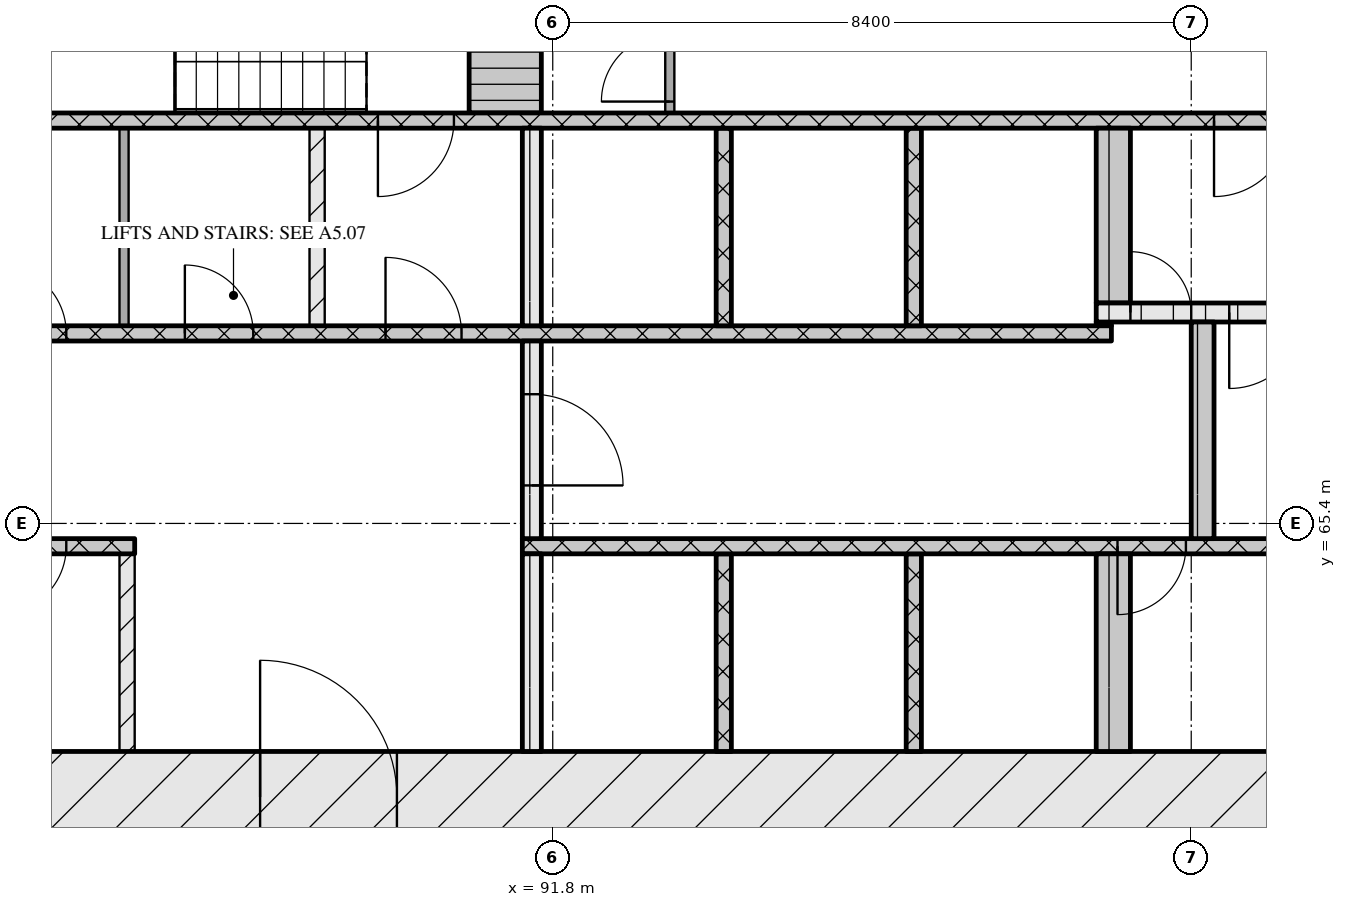
"""IFC4 building model, lengths in metres.
Left out: names, types, materials, properties, quantities, classifications, styles, units other than length and angle.
Written with IfcOpenShell. Run it as: python <this file> out.ifc"""

import sys

from ifc_helpers import new_model, si_unit, direction, frame, frame_2d, origin, place, context, subcontext, project, spatial, rectangle, extrude, element, fill, save


model = new_model("IFC4")
c1 = context("Model", 3, precision=1e-05, world=origin(), true_north=direction((0.0, 1.0)))
c2 = subcontext(c1, "Body", "Model", "MODEL_VIEW")
j1 = project(units=[si_unit("LENGTHUNIT", "METRE"), si_unit("PLANEANGLEUNIT", "RADIAN")], contexts=[c1])
p1 = place(None, origin())
s1 = spatial("IfcSite", under=j1, at=p1, CompositionType="ELEMENT")
p2 = place(p1, origin())
s2 = spatial("IfcBuilding", under=s1, at=p2, CompositionType="ELEMENT")
p3 = place(p2, frame((0.0, 0.0, 40.8)))
s3 = spatial("IfcBuildingStorey", under=s2, at=p3, CompositionType="ELEMENT", Elevation=40.8)
p4 = place(p3, frame((66.6, 61.8, 0.0), z_axis=(0.0, 0.0, 1.0), x_axis=(1.0, 0.0, 0.0)))
e1 = element("IfcWall", 1, at=p4, inside=s3, PredefinedType="SOLIDWALL", context=c2, shape_type="SweptSolid", body=[
    extrude(rectangle(XDim=42.0, YDim=1.2, at=frame_2d((21.0, 0.0))), origin(), (0.0, 0.0, 1.0), 3.32),
])
p5 = place(p4, frame((21.35, 0.0, 0.0)))
e2 = element("IfcOpeningElement", 2, at=p5, cuts=e1, PredefinedType="OPENING", context=c2, shape_type="SweptSolid", body=[
    extrude(rectangle(XDim=1.8, YDim=2.1, at=frame_2d((0.9, 1.05))), frame((0.0, 0.61, 0.0), z_axis=(0.0, -1.0, 0.0), x_axis=(1.0, 0.0, 0.0)), (0.0, 0.0, 1.0), 1.22),
])
p6 = place(p3, frame((86.2, 62.4, 0.0), z_axis=(0.0, 0.0, 1.0), x_axis=(0.0, 1.0, 0.0)))
e3 = element("IfcWall", 3, at=p6, inside=s3, PredefinedType="PARTITIONING", context=c2, shape_type="SweptSolid", body=[
    extrude(rectangle(XDim=2.6, YDim=0.2, at=frame_2d((1.3, 0.0))), origin(), (0.0, 0.0, 1.0), 3.32),
])
p7 = place(p3, frame((91.525, 62.4, 0.0), z_axis=(0.0, 0.0, 1.0), x_axis=(0.0, 1.0, 0.0)))
e4 = element("IfcWall", 4, at=p7, inside=s3, PredefinedType="SOLIDWALL", context=c2, shape_type="SweptSolid", body=[
    extrude(rectangle(XDim=2.6, YDim=0.25, at=frame_2d((1.3, 0.0))), origin(), (0.0, 0.0, 1.0), 3.32),
])
for number, where, z_axis, x_axis in (
    (5, (94.05, 62.4, 0.0), (0.0, 0.0, 1.0), (0.0, 1.0, 0.0)),
    (6, (96.55, 62.4, 0.0), (0.0, 0.0, 1.0), (0.0, 1.0, 0.0)),
):
    element("IfcWall", number, at=place(p3, frame(where, z_axis=z_axis, x_axis=x_axis)), inside=s3, PredefinedType="SOLIDWALL", context=c2, shape_type="SweptSolid", body=[
        extrude(rectangle(XDim=2.6, YDim=0.2, at=frame_2d((1.3, 0.0))), origin(), (0.0, 0.0, 1.0), 3.32),
    ])
p8 = place(p3, frame((99.175, 62.4, 0.0), z_axis=(0.0, 0.0, 1.0), x_axis=(0.0, 1.0, 0.0)))
e7 = element("IfcWall", 7, at=p8, inside=s3, PredefinedType="SOLIDWALL", context=c2, shape_type="SweptSolid", body=[
    extrude(rectangle(XDim=2.6, YDim=0.45, at=frame_2d((1.3, 0.0))), origin(), (0.0, 0.0, 1.0), 3.32),
])
p9 = place(p3, frame((67.8, 65.1, 0.0), z_axis=(0.0, 0.0, 1.0), x_axis=(1.0, 0.0, 0.0)))
e8 = element("IfcWall", 8, at=p9, inside=s3, PredefinedType="SOLIDWALL", context=c2, shape_type="SweptSolid", body=[
    extrude(rectangle(XDim=18.5, YDim=0.2, at=frame_2d((9.25, 0.0))), origin(), (0.0, 0.0, 1.0), 3.32),
])
p10 = place(p9, frame((7.27, 0.0, 0.0)))
e9 = element("IfcOpeningElement", 9, at=p10, cuts=e8, PredefinedType="OPENING", context=c2, shape_type="SweptSolid", body=[
    extrude(rectangle(XDim=0.9, YDim=2.1, at=frame_2d((0.45, 1.05))), frame((0.0, 0.11, 0.0), z_axis=(0.0, -1.0, 0.0), x_axis=(1.0, 0.0, 0.0)), (0.0, 0.0, 1.0), 0.22),
])
p11 = place(p9, frame((8.85, 0.0, 0.0)))
e10 = element("IfcOpeningElement", 10, at=p11, cuts=e8, PredefinedType="OPENING", context=c2, shape_type="SweptSolid", body=[
    extrude(rectangle(XDim=1.1, YDim=2.1, at=frame_2d((0.55, 1.05))), frame((0.0, 0.11, 0.0), z_axis=(0.0, -1.0, 0.0), x_axis=(1.0, 0.0, 0.0)), (0.0, 0.0, 1.0), 0.22),
])
p12 = place(p9, frame((11.35, 0.0, 0.0)))
e11 = element("IfcOpeningElement", 11, at=p12, cuts=e8, PredefinedType="OPENING", context=c2, shape_type="SweptSolid", body=[
    extrude(rectangle(XDim=1.1, YDim=2.1, at=frame_2d((0.55, 1.05))), frame((0.0, 0.11, 0.0), z_axis=(0.0, -1.0, 0.0), x_axis=(1.0, 0.0, 0.0)), (0.0, 0.0, 1.0), 0.22),
])
p13 = place(p9, frame((13.85, 0.0, 0.0)))
e12 = element("IfcOpeningElement", 12, at=p13, cuts=e8, PredefinedType="OPENING", context=c2, shape_type="SweptSolid", body=[
    extrude(rectangle(XDim=1.1, YDim=2.1, at=frame_2d((0.55, 1.05))), frame((0.0, 0.11, 0.0), z_axis=(0.0, -1.0, 0.0), x_axis=(1.0, 0.0, 0.0)), (0.0, 0.0, 1.0), 0.22),
])
p14 = place(p9, frame((16.7, 0.0, 0.0)))
e13 = element("IfcOpeningElement", 13, at=p14, cuts=e8, PredefinedType="OPENING", context=c2, shape_type="SweptSolid", body=[
    extrude(rectangle(XDim=0.9, YDim=2.1, at=frame_2d((0.45, 1.05))), frame((0.0, 0.11, 0.0), z_axis=(0.0, -1.0, 0.0), x_axis=(1.0, 0.0, 0.0)), (0.0, 0.0, 1.0), 0.22),
])
p15 = place(p3, frame((91.4, 65.1, 0.0), z_axis=(0.0, 0.0, 1.0), x_axis=(1.0, 0.0, 0.0)))
e14 = element("IfcWall", 14, at=p15, inside=s3, PredefinedType="SOLIDWALL", context=c2, shape_type="SweptSolid", body=[
    extrude(rectangle(XDim=16.0, YDim=0.2, at=frame_2d((8.0, 0.0))), origin(), (0.0, 0.0, 1.0), 3.32),
])
p16 = place(p15, frame((7.83, 0.0, 0.0)))
e15 = element("IfcOpeningElement", 15, at=p16, cuts=e14, PredefinedType="OPENING", context=c2, shape_type="SweptSolid", body=[
    extrude(rectangle(XDim=0.9, YDim=2.1, at=frame_2d((0.45, 1.05))), frame((0.0, 0.11, 0.0), z_axis=(0.0, -1.0, 0.0), x_axis=(1.0, 0.0, 0.0)), (0.0, 0.0, 1.0), 0.22),
])
p17 = place(p3, frame((91.525, 65.2, 0.0), z_axis=(0.0, 0.0, 1.0), x_axis=(0.0, 1.0, 0.0)))
e16 = element("IfcWall", 16, at=p17, inside=s3, PredefinedType="SOLIDWALL", context=c2, shape_type="SweptSolid", body=[
    extrude(rectangle(XDim=2.6, YDim=0.25, at=frame_2d((1.3, 0.0))), origin(), (0.0, 0.0, 1.0), 3.32),
])
p18 = place(p17, frame((0.7, 0.0, 0.0)))
e17 = element("IfcOpeningElement", 17, at=p18, cuts=e16, PredefinedType="OPENING", context=c2, shape_type="SweptSolid", body=[
    extrude(rectangle(XDim=1.2, YDim=2.1, at=frame_2d((0.6, 1.05))), frame((0.0, 0.135, 0.0), z_axis=(0.0, -1.0, 0.0), x_axis=(1.0, 0.0, 0.0)), (0.0, 0.0, 1.0), 0.27),
])
p19 = place(p3, frame((100.35, 65.2, 0.0), z_axis=(0.0, 0.0, 1.0), x_axis=(0.0, 1.0, 0.0)))
e18 = element("IfcWall", 18, at=p19, inside=s3, PredefinedType="SOLIDWALL", context=c2, shape_type="SweptSolid", body=[
    extrude(rectangle(XDim=2.85, YDim=0.3, at=frame_2d((1.425, 0.0))), origin(), (0.0, 0.0, 1.0), 3.32),
])
p20 = place(p3, frame((76.05, 67.9, 0.0), z_axis=(0.0, 0.0, 1.0), x_axis=(1.0, 0.0, 0.0)))
e19 = element("IfcWall", 19, at=p20, inside=s3, PredefinedType="SOLIDWALL", context=c2, shape_type="SweptSolid", body=[
    extrude(rectangle(XDim=23.1, YDim=0.2, at=frame_2d((11.55, 0.0))), origin(), (0.0, 0.0, 1.0), 3.32),
])
p21 = place(p20, frame((0.6, 0.0, 0.0)))
e20 = element("IfcOpeningElement", 20, at=p21, cuts=e19, PredefinedType="OPENING", context=c2, shape_type="SweptSolid", body=[
    extrude(rectangle(XDim=1.1, YDim=2.1, at=frame_2d((0.55, 1.05))), frame((0.0, 0.11, 0.0), z_axis=(0.0, -1.0, 0.0), x_axis=(1.0, 0.0, 0.0)), (0.0, 0.0, 1.0), 0.22),
])
p22 = place(p20, frame((3.1, 0.0, 0.0)))
e21 = element("IfcOpeningElement", 21, at=p22, cuts=e19, PredefinedType="OPENING", context=c2, shape_type="SweptSolid", body=[
    extrude(rectangle(XDim=1.1, YDim=2.1, at=frame_2d((0.55, 1.05))), frame((0.0, 0.11, 0.0), z_axis=(0.0, -1.0, 0.0), x_axis=(1.0, 0.0, 0.0)), (0.0, 0.0, 1.0), 0.22),
])
p23 = place(p20, frame((5.6, 0.0, 0.0)))
e22 = element("IfcOpeningElement", 22, at=p23, cuts=e19, PredefinedType="OPENING", context=c2, shape_type="SweptSolid", body=[
    extrude(rectangle(XDim=1.1, YDim=2.1, at=frame_2d((0.55, 1.05))), frame((0.0, 0.11, 0.0), z_axis=(0.0, -1.0, 0.0), x_axis=(1.0, 0.0, 0.0)), (0.0, 0.0, 1.0), 0.22),
])
p24 = place(p20, frame((8.45, 0.0, 0.0)))
e23 = element("IfcOpeningElement", 23, at=p24, cuts=e19, PredefinedType="OPENING", context=c2, shape_type="SweptSolid", body=[
    extrude(rectangle(XDim=0.9, YDim=2.1, at=frame_2d((0.45, 1.05))), frame((0.0, 0.11, 0.0), z_axis=(0.0, -1.0, 0.0), x_axis=(1.0, 0.0, 0.0)), (0.0, 0.0, 1.0), 0.22),
])
p25 = place(p20, frame((10.91, 0.0, 0.0)))
e24 = element("IfcOpeningElement", 24, at=p25, cuts=e19, PredefinedType="OPENING", context=c2, shape_type="SweptSolid", body=[
    extrude(rectangle(XDim=0.9, YDim=2.1, at=frame_2d((0.45, 1.05))), frame((0.0, 0.11, 0.0), z_axis=(0.0, -1.0, 0.0), x_axis=(1.0, 0.0, 0.0)), (0.0, 0.0, 1.0), 0.22),
])
p26 = place(p20, frame((13.55, 0.0, 0.0)))
e25 = element("IfcOpeningElement", 25, at=p26, cuts=e19, PredefinedType="OPENING", context=c2, shape_type="SweptSolid", body=[
    extrude(rectangle(XDim=1.0, YDim=2.1, at=frame_2d((0.5, 1.05))), frame((0.0, 0.11, 0.0), z_axis=(0.0, -1.0, 0.0), x_axis=(1.0, 0.0, 0.0)), (0.0, 0.0, 1.0), 0.22),
])
p27 = place(p3, frame((86.16, 68.0, 0.0), z_axis=(0.0, 0.0, 1.0), x_axis=(0.0, 1.0, 0.0)))
e26 = element("IfcWall", 26, at=p27, inside=s3, PredefinedType="PARTITIONING", context=c2, shape_type="SweptSolid", body=[
    extrude(rectangle(XDim=2.6, YDim=0.12, at=frame_2d((1.3, 0.0))), origin(), (0.0, 0.0, 1.0), 3.32),
])
p28 = place(p3, frame((88.7, 68.0, 0.0), z_axis=(0.0, 0.0, 1.0), x_axis=(0.0, 1.0, 0.0)))
e27 = element("IfcWall", 27, at=p28, inside=s3, PredefinedType="PARTITIONING", context=c2, shape_type="SweptSolid", body=[
    extrude(rectangle(XDim=2.6, YDim=0.2, at=frame_2d((1.3, 0.0))), origin(), (0.0, 0.0, 1.0), 3.32),
])
p29 = place(p3, frame((91.525, 68.0, 0.0), z_axis=(0.0, 0.0, 1.0), x_axis=(0.0, 1.0, 0.0)))
e28 = element("IfcWall", 28, at=p29, inside=s3, PredefinedType="SOLIDWALL", context=c2, shape_type="SweptSolid", body=[
    extrude(rectangle(XDim=2.6, YDim=0.25, at=frame_2d((1.3, 0.0))), origin(), (0.0, 0.0, 1.0), 3.32),
])
for number, where, z_axis, x_axis in (
    (29, (94.05, 68.0, 0.0), (0.0, 0.0, 1.0), (0.0, 1.0, 0.0)),
    (30, (96.55, 68.0, 0.0), (0.0, 0.0, 1.0), (0.0, 1.0, 0.0)),
):
    element("IfcWall", number, at=place(p3, frame(where, z_axis=z_axis, x_axis=x_axis)), inside=s3, PredefinedType="SOLIDWALL", context=c2, shape_type="SweptSolid", body=[
        extrude(rectangle(XDim=2.6, YDim=0.2, at=frame_2d((1.3, 0.0))), origin(), (0.0, 0.0, 1.0), 3.32),
    ])
p30 = place(p3, frame((98.95, 68.025, 0.0), z_axis=(0.0, 0.0, 1.0), x_axis=(1.0, 0.0, 0.0)))
e31 = element("IfcWall", 31, at=p30, inside=s3, PredefinedType="SOLIDWALL", context=c2, shape_type="SweptSolid", body=[
    extrude(rectangle(XDim=0.2, YDim=0.05, at=frame_2d((0.1, 0.0))), origin(), (0.0, 0.0, 1.0), 3.32),
])
p31 = place(p3, frame((98.95, 68.175, 0.0), z_axis=(0.0, 0.0, 1.0), x_axis=(1.0, 0.0, 0.0)))
e32 = element("IfcWall", 32, at=p31, inside=s3, PredefinedType="SOLIDWALL", context=c2, shape_type="SweptSolid", body=[
    extrude(rectangle(XDim=8.45, YDim=0.25, at=frame_2d((4.225, 0.0))), origin(), (0.0, 0.0, 1.0), 3.32),
])
p32 = place(p31, frame((0.45, 0.0, 0.0)))
e33 = element("IfcOpeningElement", 33, at=p32, cuts=e32, PredefinedType="OPENING", context=c2, shape_type="SweptSolid", body=[
    extrude(rectangle(XDim=0.8, YDim=2.1, at=frame_2d((0.4, 1.05))), frame((0.0, 0.135, 0.0), z_axis=(0.0, -1.0, 0.0), x_axis=(1.0, 0.0, 0.0)), (0.0, 0.0, 1.0), 0.27),
])
p33 = place(p31, frame((1.75, 0.0, 0.0)))
e34 = element("IfcOpeningElement", 34, at=p33, cuts=e32, PredefinedType="OPENING", context=c2, shape_type="SweptSolid", body=[
    extrude(rectangle(XDim=1.0, YDim=2.1, at=frame_2d((0.5, 1.05))), frame((0.0, 0.135, 0.0), z_axis=(0.0, -1.0, 0.0), x_axis=(1.0, 0.0, 0.0)), (0.0, 0.0, 1.0), 0.27),
])
p34 = place(p3, frame((99.175, 68.3, 0.0), z_axis=(0.0, 0.0, 1.0), x_axis=(0.0, 1.0, 0.0)))
e35 = element("IfcWall", 35, at=p34, inside=s3, PredefinedType="SOLIDWALL", context=c2, shape_type="SweptSolid", body=[
    extrude(rectangle(XDim=2.3, YDim=0.45, at=frame_2d((1.15, 0.0))), origin(), (0.0, 0.0, 1.0), 3.32),
])
p35 = place(p3, frame((67.8, 70.7, 0.0), z_axis=(0.0, 0.0, 1.0), x_axis=(1.0, 0.0, 0.0)))
e36 = element("IfcWall", 36, at=p35, inside=s3, PredefinedType="SOLIDWALL", context=c2, shape_type="SweptSolid", body=[
    extrude(rectangle(XDim=39.6, YDim=0.2, at=frame_2d((19.8, 0.0))), origin(), (0.0, 0.0, 1.0), 3.32),
])
p36 = place(p35, frame((0.65, 0.0, 0.0)))
e37 = element("IfcOpeningElement", 37, at=p36, cuts=e36, PredefinedType="OPENING", context=c2, shape_type="SweptSolid", body=[
    extrude(rectangle(XDim=1.1, YDim=2.1, at=frame_2d((0.55, 1.05))), frame((0.0, 0.11, 0.0), z_axis=(0.0, -1.0, 0.0), x_axis=(1.0, 0.0, 0.0)), (0.0, 0.0, 1.0), 0.22),
])
p37 = place(p35, frame((3.25, 0.0, 0.0)))
e38 = element("IfcOpeningElement", 38, at=p37, cuts=e36, PredefinedType="OPENING", context=c2, shape_type="SweptSolid", body=[
    extrude(rectangle(XDim=1.1, YDim=2.1, at=frame_2d((0.55, 1.05))), frame((0.0, 0.11, 0.0), z_axis=(0.0, -1.0, 0.0), x_axis=(1.0, 0.0, 0.0)), (0.0, 0.0, 1.0), 0.22),
])
p38 = place(p35, frame((5.9, 0.0, 0.0)))
e39 = element("IfcOpeningElement", 39, at=p38, cuts=e36, PredefinedType="OPENING", context=c2, shape_type="SweptSolid", body=[
    extrude(rectangle(XDim=1.0, YDim=2.1, at=frame_2d((0.5, 1.05))), frame((0.0, 0.11, 0.0), z_axis=(0.0, -1.0, 0.0), x_axis=(1.0, 0.0, 0.0)), (0.0, 0.0, 1.0), 0.22),
])
p39 = place(p35, frame((21.7, 0.0, 0.0)))
e40 = element("IfcOpeningElement", 40, at=p39, cuts=e36, PredefinedType="OPENING", context=c2, shape_type="SweptSolid", body=[
    extrude(rectangle(XDim=1.0, YDim=2.1, at=frame_2d((0.5, 1.05))), frame((0.0, 0.11, 0.0), z_axis=(0.0, -1.0, 0.0), x_axis=(1.0, 0.0, 0.0)), (0.0, 0.0, 1.0), 0.22),
])
p40 = place(p35, frame((32.7, 0.0, 0.0)))
e41 = element("IfcOpeningElement", 41, at=p40, cuts=e36, PredefinedType="OPENING", context=c2, shape_type="SweptSolid", body=[
    extrude(rectangle(XDim=1.0, YDim=2.1, at=frame_2d((0.5, 1.05))), frame((0.0, 0.11, 0.0), z_axis=(0.0, -1.0, 0.0), x_axis=(1.0, 0.0, 0.0)), (0.0, 0.0, 1.0), 0.22),
])
p41 = place(p35, frame((35.25, 0.0, 0.0)))
e42 = element("IfcOpeningElement", 42, at=p41, cuts=e36, PredefinedType="OPENING", context=c2, shape_type="SweptSolid", body=[
    extrude(rectangle(XDim=1.1, YDim=2.1, at=frame_2d((0.55, 1.05))), frame((0.0, 0.11, 0.0), z_axis=(0.0, -1.0, 0.0), x_axis=(1.0, 0.0, 0.0)), (0.0, 0.0, 1.0), 0.22),
])
p42 = place(p35, frame((37.85, 0.0, 0.0)))
e43 = element("IfcOpeningElement", 43, at=p42, cuts=e36, PredefinedType="OPENING", context=c2, shape_type="SweptSolid", body=[
    extrude(rectangle(XDim=1.1, YDim=2.1, at=frame_2d((0.55, 1.05))), frame((0.0, 0.11, 0.0), z_axis=(0.0, -1.0, 0.0), x_axis=(1.0, 0.0, 0.0)), (0.0, 0.0, 1.0), 0.22),
])
p43 = place(p3, frame((91.175, 70.8, 0.0), z_axis=(0.0, 0.0, 1.0), x_axis=(0.0, 1.0, 0.0)))
e44 = element("IfcWall", 44, at=p43, inside=s3, PredefinedType="SOLIDWALL", context=c2, shape_type="SweptSolid", body=[
    extrude(rectangle(XDim=2.95, YDim=0.95, at=frame_2d((1.475, 0.0))), origin(), (0.0, 0.0, 1.0), 3.32),
])
p44 = place(p3, frame((93.34, 70.8, 0.0), z_axis=(0.0, 0.0, 1.0), x_axis=(0.0, 1.0, 0.0)))
e45 = element("IfcWall", 45, at=p44, inside=s3, PredefinedType="PARTITIONING", context=c2, shape_type="SweptSolid", body=[
    extrude(rectangle(XDim=1.2, YDim=0.12, at=frame_2d((0.6, 0.0))), origin(), (0.0, 0.0, 1.0), 3.32),
])
p45 = place(p44, frame((0.15, 0.0, 0.0)))
e46 = element("IfcOpeningElement", 46, at=p45, cuts=e45, PredefinedType="OPENING", context=c2, shape_type="SweptSolid", body=[
    extrude(rectangle(XDim=0.9, YDim=2.1, at=frame_2d((0.45, 1.05))), frame((0.0, 0.07, 0.0), z_axis=(0.0, -1.0, 0.0), x_axis=(1.0, 0.0, 0.0)), (0.0, 0.0, 1.0), 0.14),
])
p46 = place(p5, origin())
e47 = element("IfcDoor", 47, at=p46, inside=s3, OperationType="DOUBLE_DOOR_SINGLE_SWING", PredefinedType="DOOR", context=c2, shape_type="SweptSolid", body=[
    extrude(rectangle(XDim=1.8, YDim=2.1, at=frame_2d((0.9, 1.05))), frame((0.0, 0.025, 0.0), z_axis=(0.0, -1.0, 0.0), x_axis=(1.0, 0.0, 0.0)), (0.0, 0.0, 1.0), 0.05),
])
fill(e2, e47)
p47 = place(p14, origin())
e48 = element("IfcDoor", 48, at=p47, inside=s3, OperationType="SINGLE_SWING_RIGHT", PredefinedType="DOOR", context=c2, shape_type="SweptSolid", body=[
    extrude(rectangle(XDim=0.9, YDim=2.1, at=frame_2d((0.45, 1.05))), frame((0.0, 0.025, 0.0), z_axis=(0.0, -1.0, 0.0), x_axis=(1.0, 0.0, 0.0)), (0.0, 0.0, 1.0), 0.05),
])
fill(e13, e48)
p48 = place(p16, origin())
e49 = element("IfcDoor", 49, at=p48, inside=s3, OperationType="SINGLE_SWING_RIGHT", PredefinedType="DOOR", context=c2, shape_type="SweptSolid", body=[
    extrude(rectangle(XDim=0.9, YDim=2.1, at=frame_2d((0.45, 1.05))), frame((0.0, 0.025, 0.0), z_axis=(0.0, -1.0, 0.0), x_axis=(1.0, 0.0, 0.0)), (0.0, 0.0, 1.0), 0.05),
])
fill(e15, e49)
p49 = place(p18, origin())
e50 = element("IfcDoor", 50, at=p49, inside=s3, OperationType="SINGLE_SWING_RIGHT", PredefinedType="DOOR", context=c2, shape_type="SweptSolid", body=[
    extrude(rectangle(XDim=1.2, YDim=2.1, at=frame_2d((0.6, 1.05))), frame((0.0, 0.025, 0.0), z_axis=(0.0, -1.0, 0.0), x_axis=(1.0, 0.0, 0.0)), (0.0, 0.0, 1.0), 0.05),
])
fill(e17, e50)
p50 = place(p24, origin())
e51 = element("IfcDoor", 51, at=p50, inside=s3, OperationType="SINGLE_SWING_LEFT", PredefinedType="DOOR", context=c2, shape_type="SweptSolid", body=[
    extrude(rectangle(XDim=0.9, YDim=2.1, at=frame_2d((0.45, 1.05))), frame((0.0, 0.025, 0.0), z_axis=(0.0, -1.0, 0.0), x_axis=(1.0, 0.0, 0.0)), (0.0, 0.0, 1.0), 0.05),
])
fill(e23, e51)
p51 = place(p25, origin())
e52 = element("IfcDoor", 52, at=p51, inside=s3, OperationType="SINGLE_SWING_LEFT", PredefinedType="DOOR", context=c2, shape_type="SweptSolid", body=[
    extrude(rectangle(XDim=0.9, YDim=2.1, at=frame_2d((0.45, 1.05))), frame((0.0, 0.025, 0.0), z_axis=(0.0, -1.0, 0.0), x_axis=(1.0, 0.0, 0.0)), (0.0, 0.0, 1.0), 0.05),
])
fill(e24, e52)
p52 = place(p26, origin())
e53 = element("IfcDoor", 53, at=p52, inside=s3, OperationType="SINGLE_SWING_LEFT", PredefinedType="DOOR", context=c2, shape_type="SweptSolid", body=[
    extrude(rectangle(XDim=1.0, YDim=2.1, at=frame_2d((0.5, 1.05))), frame((0.0, 0.025, 0.0), z_axis=(0.0, -1.0, 0.0), x_axis=(1.0, 0.0, 0.0)), (0.0, 0.0, 1.0), 0.05),
])
fill(e25, e53)
p53 = place(p32, origin())
e54 = element("IfcDoor", 54, at=p53, inside=s3, OperationType="SINGLE_SWING_LEFT", PredefinedType="DOOR", context=c2, shape_type="SweptSolid", body=[
    extrude(rectangle(XDim=0.8, YDim=2.1, at=frame_2d((0.4, 1.05))), frame((0.0, 0.025, 0.0), z_axis=(0.0, -1.0, 0.0), x_axis=(1.0, 0.0, 0.0)), (0.0, 0.0, 1.0), 0.05),
])
fill(e33, e54)
p54 = place(p33, origin())
e55 = element("IfcDoor", 55, at=p54, inside=s3, OperationType="SINGLE_SWING_RIGHT", PredefinedType="DOOR", context=c2, shape_type="SweptSolid", body=[
    extrude(rectangle(XDim=1.0, YDim=2.1, at=frame_2d((0.5, 1.05))), frame((0.0, 0.025, 0.0), z_axis=(0.0, -1.0, 0.0), x_axis=(1.0, 0.0, 0.0)), (0.0, 0.0, 1.0), 0.05),
])
fill(e34, e55)
p55 = place(p39, origin())
e56 = element("IfcDoor", 56, at=p55, inside=s3, OperationType="SINGLE_SWING_RIGHT", PredefinedType="DOOR", context=c2, shape_type="SweptSolid", body=[
    extrude(rectangle(XDim=1.0, YDim=2.1, at=frame_2d((0.5, 1.05))), frame((0.0, 0.025, 0.0), z_axis=(0.0, -1.0, 0.0), x_axis=(1.0, 0.0, 0.0)), (0.0, 0.0, 1.0), 0.05),
])
fill(e40, e56)
p56 = place(p40, origin())
e57 = element("IfcDoor", 57, at=p56, inside=s3, OperationType="SINGLE_SWING_RIGHT", PredefinedType="DOOR", context=c2, shape_type="SweptSolid", body=[
    extrude(rectangle(XDim=1.0, YDim=2.1, at=frame_2d((0.5, 1.05))), frame((0.0, 0.025, 0.0), z_axis=(0.0, -1.0, 0.0), x_axis=(1.0, 0.0, 0.0)), (0.0, 0.0, 1.0), 0.05),
])
fill(e41, e57)
p57 = place(p45, origin())
e58 = element("IfcDoor", 58, at=p57, inside=s3, OperationType="SINGLE_SWING_LEFT", PredefinedType="DOOR", context=c2, shape_type="SweptSolid", body=[
    extrude(rectangle(XDim=0.9, YDim=2.1, at=frame_2d((0.45, 1.05))), frame((0.0, 0.025, 0.0), z_axis=(0.0, -1.0, 0.0), x_axis=(1.0, 0.0, 0.0)), (0.0, 0.0, 1.0), 0.05),
])
fill(e46, e58)
save(model, sys.argv[1])
